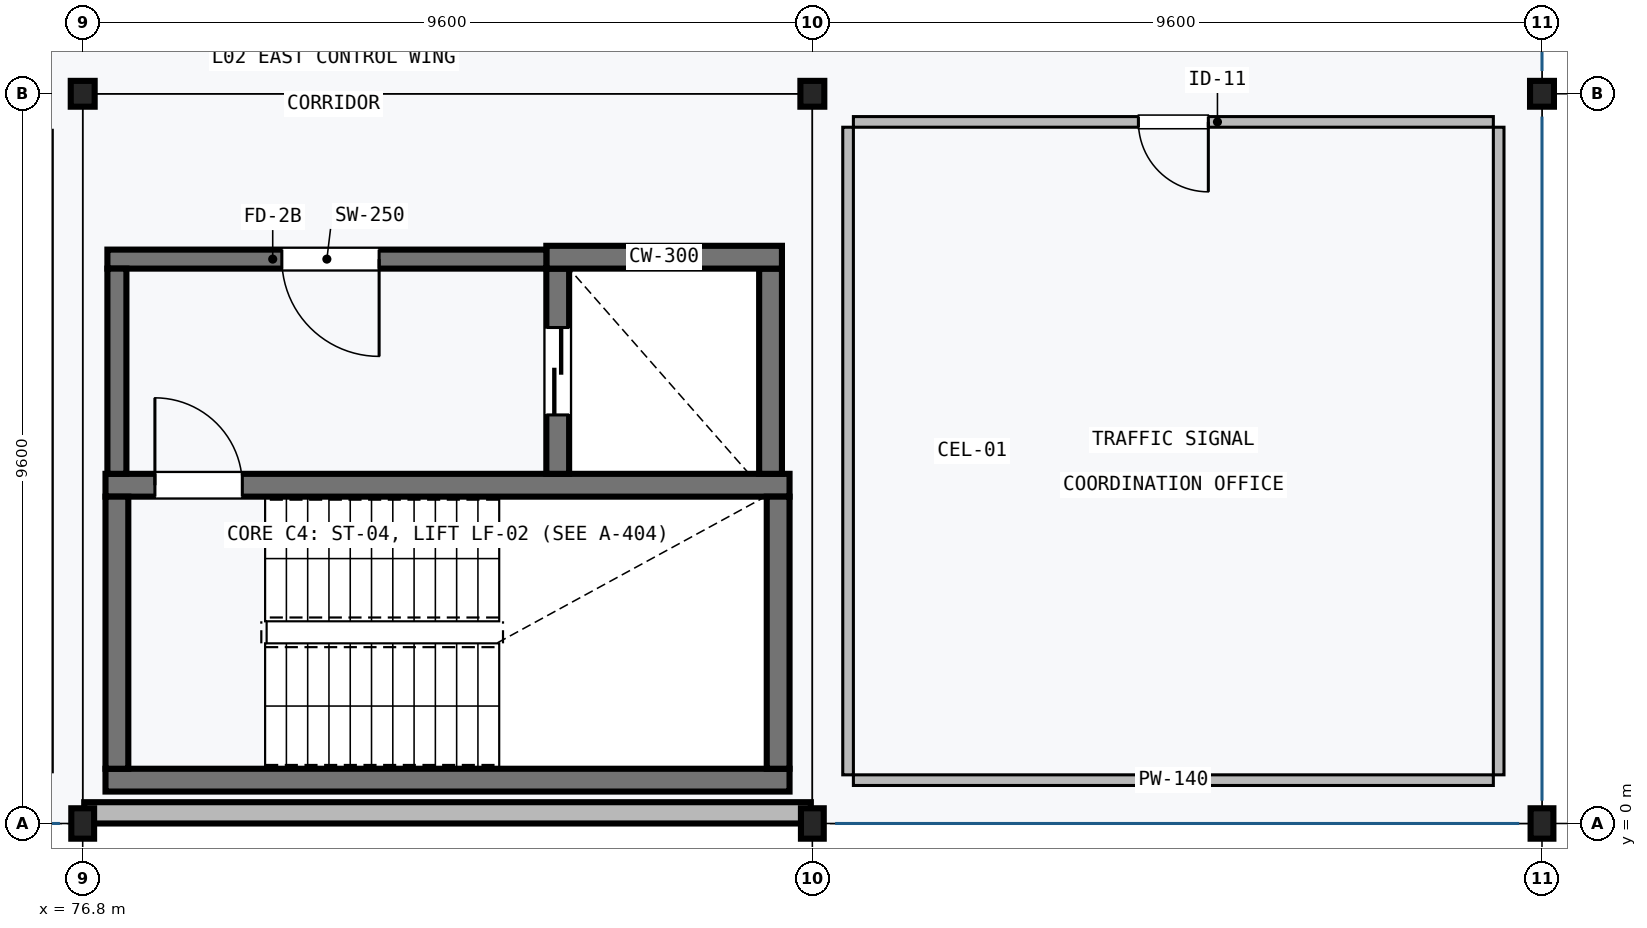
"""IFC4 building model, lengths in metres.
Left out: names, types, materials, properties, quantities, classifications, styles, units other than length and angle.
Written with IfcOpenShell. Run it as: python <this file> out.ifc"""

import sys

from ifc_helpers import new_model, si_unit, direction, frame, frame_2d, origin, origin_2d, place, context, subcontext, project, spatial, rectangle, i_section, extrude, element, fill, save


model = new_model("IFC4")
c1 = context("Model", 3, precision=1e-05, world=origin(), true_north=direction((0.0, 1.0)))
c2 = subcontext(c1, "Body", "Model", "MODEL_VIEW")
j1 = project(units=[si_unit("LENGTHUNIT", "METRE"), si_unit("PLANEANGLEUNIT", "RADIAN")], contexts=[c1])
p1 = place(None, origin())
s1 = spatial("IfcSite", under=j1, at=p1, CompositionType="ELEMENT")
p2 = place(p1, origin())
s2 = spatial("IfcBuilding", under=s1, at=p2, CompositionType="ELEMENT")
p3 = place(p2, frame((0.0, 0.0, 10.5)))
s3 = spatial("IfcBuildingStorey", under=s2, at=p3, CompositionType="ELEMENT", Elevation=10.5)
p4 = place(p3, frame((76.8, 0.0, 0.0), z_axis=(0.0, 0.0, 1.0), x_axis=(1.0, 0.0, 0.0)))
e1 = element("IfcColumn", 1, at=p4, inside=s3, PredefinedType="COLUMN", context=c2, shape_type="SweptSolid", body=[
    extrude(i_section(OverallWidth=0.3, OverallDepth=0.4, WebThickness=0.013, FlangeThickness=0.024, FilletRadius=0.027, at=origin_2d()), origin(), (0.0, 0.0, 1.0), 3.95),
])
p5 = place(p3, frame((76.8, 9.6, 0.0), z_axis=(0.0, 0.0, 1.0), x_axis=(1.0, 0.0, 0.0)))
e2 = element("IfcColumn", 2, at=p5, inside=s3, PredefinedType="COLUMN", context=c2, shape_type="SweptSolid", body=[
    extrude(i_section(OverallWidth=0.314, OverallDepth=0.34, WebThickness=0.019, FlangeThickness=0.031, FilletRadius=0.015, at=origin_2d()), origin(), (0.0, 0.0, 1.0), 3.95),
])
p6 = place(p3, frame((86.4, 0.0, 0.0), z_axis=(0.0, 0.0, 1.0), x_axis=(1.0, 0.0, 0.0)))
e3 = element("IfcColumn", 3, at=p6, inside=s3, PredefinedType="COLUMN", context=c2, shape_type="SweptSolid", body=[
    extrude(i_section(OverallWidth=0.3, OverallDepth=0.4, WebThickness=0.013, FlangeThickness=0.024, FilletRadius=0.027, at=origin_2d()), origin(), (0.0, 0.0, 1.0), 3.95),
])
p7 = place(p3, frame((86.4, 9.6, 0.0), z_axis=(0.0, 0.0, 1.0), x_axis=(1.0, 0.0, 0.0)))
e4 = element("IfcColumn", 4, at=p7, inside=s3, PredefinedType="COLUMN", context=c2, shape_type="SweptSolid", body=[
    extrude(i_section(OverallWidth=0.314, OverallDepth=0.34, WebThickness=0.019, FlangeThickness=0.031, FilletRadius=0.015, at=origin_2d()), origin(), (0.0, 0.0, 1.0), 3.95),
])
p8 = place(p3, frame((96.0, 0.0, 0.0), z_axis=(0.0, 0.0, 1.0), x_axis=(1.0, 0.0, 0.0)))
e5 = element("IfcColumn", 5, at=p8, inside=s3, PredefinedType="COLUMN", context=c2, shape_type="SweptSolid", body=[
    extrude(i_section(OverallWidth=0.3, OverallDepth=0.4, WebThickness=0.013, FlangeThickness=0.024, FilletRadius=0.027, at=origin_2d()), origin(), (0.0, 0.0, 1.0), 3.95),
])
p9 = place(p3, frame((96.0, 9.6, 0.0), z_axis=(0.0, 0.0, 1.0), x_axis=(1.0, 0.0, 0.0)))
e6 = element("IfcColumn", 6, at=p9, inside=s3, PredefinedType="COLUMN", context=c2, shape_type="SweptSolid", body=[
    extrude(i_section(OverallWidth=0.314, OverallDepth=0.34, WebThickness=0.019, FlangeThickness=0.031, FilletRadius=0.015, at=origin_2d()), origin(), (0.0, 0.0, 1.0), 3.95),
])
p10 = place(p3, frame((77.1, 0.57, 0.0), z_axis=(0.0, 0.0, 1.0), x_axis=(1.0, 0.0, 0.0)))
e7 = element("IfcWall", 7, at=p10, inside=s3, PredefinedType="SHEAR", context=c2, shape_type="SweptSolid", body=[
    extrude(rectangle(XDim=9.0, YDim=0.3, at=frame_2d((4.5, 0.0))), origin(), (0.0, 0.0, 1.0), 3.95),
])
p11 = place(p3, frame((86.1, 4.45, 0.0), z_axis=(0.0, 0.0, 1.0), x_axis=(-1.0, 0.0, 0.0)))
e8 = element("IfcWall", 8, at=p11, inside=s3, PredefinedType="SHEAR", context=c2, shape_type="SweptSolid", body=[
    extrude(rectangle(XDim=9.0, YDim=0.3, at=frame_2d((4.5, 0.0))), origin(), (0.0, 0.0, 1.0), 3.95),
])
p12 = place(p11, frame((7.2, 0.0, 0.0)))
e9 = element("IfcOpeningElement", 9, at=p12, cuts=e8, PredefinedType="OPENING", context=c2, shape_type="SweptSolid", body=[
    extrude(rectangle(XDim=1.15, YDim=2.15, at=frame_2d((0.575, 1.075))), frame((0.0, 0.16, 0.0), z_axis=(0.0, -1.0, 0.0), x_axis=(1.0, 0.0, 0.0)), (0.0, 0.0, 1.0), 0.32),
])
for number, where, z_axis, x_axis in (
    (10, (77.25, 0.72, 0.0), (0.0, 0.0, 1.0), (0.0, 1.0, 0.0)),
    (11, (85.95, 4.3, 0.0), (0.0, 0.0, 1.0), (0.0, -1.0, 0.0)),
):
    element("IfcWall", number, at=place(p3, frame(where, z_axis=z_axis, x_axis=x_axis)), inside=s3, PredefinedType="SHEAR", context=c2, shape_type="SweptSolid", body=[
        extrude(rectangle(XDim=3.58, YDim=0.3, at=frame_2d((1.79, 0.0))), origin(), (0.0, 0.0, 1.0), 3.95),
    ])
p13 = place(p3, frame((83.05, 7.3, 0.0), z_axis=(0.0, 0.0, 1.0), x_axis=(0.0, -1.0, 0.0)))
e12 = element("IfcWall", 12, at=p13, inside=s3, PredefinedType="SHEAR", context=c2, shape_type="SweptSolid", body=[
    extrude(rectangle(XDim=2.7, YDim=0.3, at=frame_2d((1.35, 0.0))), origin(), (0.0, 0.0, 1.0), 3.95),
])
p14 = place(p13, frame((0.775, 0.0, 0.0)))
e13 = element("IfcOpeningElement", 13, at=p14, cuts=e12, PredefinedType="OPENING", context=c2, shape_type="SweptSolid", body=[
    extrude(rectangle(XDim=1.15, YDim=2.1, at=frame_2d((0.575, 1.05))), frame((0.0, 0.16, 0.0), z_axis=(0.0, -1.0, 0.0), x_axis=(1.0, 0.0, 0.0)), (0.0, 0.0, 1.0), 0.32),
])
p15 = place(p3, frame((85.85, 4.6, 0.0), z_axis=(0.0, 0.0, 1.0), x_axis=(0.0, 1.0, 0.0)))
e14 = element("IfcWall", 14, at=p15, inside=s3, PredefinedType="SHEAR", context=c2, shape_type="SweptSolid", body=[
    extrude(rectangle(XDim=2.7, YDim=0.3, at=frame_2d((1.35, 0.0))), origin(), (0.0, 0.0, 1.0), 3.95),
])
p16 = place(p3, frame((82.9, 7.45, 0.0), z_axis=(0.0, 0.0, 1.0), x_axis=(1.0, 0.0, 0.0)))
e15 = element("IfcWall", 15, at=p16, inside=s3, PredefinedType="SHEAR", context=c2, shape_type="SweptSolid", body=[
    extrude(rectangle(XDim=3.1, YDim=0.3, at=frame_2d((1.55, 0.0))), origin(), (0.0, 0.0, 1.0), 3.95),
])
p17 = place(p3, frame((82.9, 7.425, 0.0), z_axis=(0.0, 0.0, 1.0), x_axis=(-1.0, 0.0, 0.0)))
e16 = element("IfcWall", 16, at=p17, inside=s3, PredefinedType="SHEAR", context=c2, shape_type="SweptSolid", body=[
    extrude(rectangle(XDim=5.775, YDim=0.25, at=frame_2d((2.887, 0.0))), origin(), (0.0, 0.0, 1.0), 3.95),
])
p18 = place(p17, frame((2.2, 0.0, 0.0)))
e17 = element("IfcOpeningElement", 17, at=p18, cuts=e16, PredefinedType="OPENING", context=c2, shape_type="SweptSolid", body=[
    extrude(rectangle(XDim=1.28, YDim=2.2, at=frame_2d((0.64, 1.1))), frame((0.0, 0.135, 0.0), z_axis=(0.0, -1.0, 0.0), x_axis=(1.0, 0.0, 0.0)), (0.0, 0.0, 1.0), 0.27),
])
p19 = place(p3, frame((77.25, 4.6, 0.0), z_axis=(0.0, 0.0, 1.0), x_axis=(0.0, 1.0, 0.0)))
e18 = element("IfcWall", 18, at=p19, inside=s3, PredefinedType="SHEAR", context=c2, shape_type="SweptSolid", body=[
    extrude(rectangle(XDim=2.7, YDim=0.25, at=frame_2d((1.35, 0.0))), origin(), (0.0, 0.0, 1.0), 3.95),
])
p20 = place(p3, frame((86.38, 0.14, 0.0), z_axis=(0.0, 0.0, 1.0), x_axis=(-1.0, 0.0, 0.0)))
e19 = element("IfcWall", 19, at=p20, inside=s3, PredefinedType="SOLIDWALL", context=c2, shape_type="SweptSolid", body=[
    extrude(rectangle(XDim=9.56, YDim=0.28, at=frame_2d((4.78, 0.0))), origin(), (0.0, 0.0, 1.0), 3.66),
])
p21 = place(p3, frame((76.31, 9.12, 0.0), z_axis=(0.0, 0.0, 1.0), x_axis=(0.0, -1.0, 0.0)))
e20 = element("IfcWall", 20, at=p21, inside=s3, PredefinedType="PARTITIONING", context=c2, shape_type="SweptSolid", body=[
    extrude(rectangle(XDim=8.44, YDim=0.18, at=frame_2d((4.22, 0.0))), origin(), (0.0, 0.0, 1.0), 3.59),
])
p22 = place(p3, frame((95.36, 0.57, 0.0), z_axis=(0.0, 0.0, 1.0), x_axis=(-1.0, 0.0, 0.0)))
e21 = element("IfcWall", 21, at=p22, inside=s3, PredefinedType="PARTITIONING", context=c2, shape_type="SweptSolid", body=[
    extrude(rectangle(XDim=8.42, YDim=0.14, at=frame_2d((4.21, 0.0))), origin(), (0.0, 0.0, 1.0), 3.59),
])
p23 = place(p3, frame((86.94, 9.23, 0.0), z_axis=(0.0, 0.0, 1.0), x_axis=(1.0, 0.0, 0.0)))
e22 = element("IfcWall", 22, at=p23, inside=s3, PredefinedType="PARTITIONING", context=c2, shape_type="SweptSolid", body=[
    extrude(rectangle(XDim=8.42, YDim=0.14, at=frame_2d((4.21, 0.0))), origin(), (0.0, 0.0, 1.0), 3.59),
])
p24 = place(p23, frame((3.75, 0.0, 0.0)))
e23 = element("IfcOpeningElement", 23, at=p24, cuts=e22, PredefinedType="OPENING", context=c2, shape_type="SweptSolid", body=[
    extrude(rectangle(XDim=0.92, YDim=2.15, at=frame_2d((0.46, 1.075))), frame((0.0, 0.08, 0.0), z_axis=(0.0, -1.0, 0.0), x_axis=(1.0, 0.0, 0.0)), (0.0, 0.0, 1.0), 0.16),
])
for number, where, z_axis, x_axis in (
    (24, (86.87, 0.64, 0.0), (0.0, 0.0, 1.0), (0.0, 1.0, 0.0)),
    (25, (95.43, 9.16, 0.0), (0.0, 0.0, 1.0), (0.0, -1.0, 0.0)),
):
    element("IfcWall", number, at=place(p3, frame(where, z_axis=z_axis, x_axis=x_axis)), inside=s3, PredefinedType="PARTITIONING", context=c2, shape_type="SweptSolid", body=[
        extrude(rectangle(XDim=8.52, YDim=0.14, at=frame_2d((4.26, 0.0))), origin(), (0.0, 0.0, 1.0), 3.59),
    ])
p25 = place(p12, frame((1.15, 0.0, 0.0), z_axis=(0.0, 0.0, 1.0), x_axis=(-1.0, 0.0, 0.0)))
e26 = element("IfcDoor", 26, at=p25, inside=s3, OperationType="SINGLE_SWING_RIGHT", PredefinedType="DOOR", context=c2, shape_type="SweptSolid", body=[
    extrude(rectangle(XDim=1.15, YDim=2.15, at=frame_2d((0.575, 1.075))), frame((0.0, 0.025, 0.0), z_axis=(0.0, -1.0, 0.0), x_axis=(1.0, 0.0, 0.0)), (0.0, 0.0, 1.0), 0.05),
])
fill(e9, e26)
p26 = place(p14, frame((1.15, 0.0, 0.0), z_axis=(0.0, 0.0, 1.0), x_axis=(-1.0, 0.0, 0.0)))
e27 = element("IfcDoor", 27, at=p26, inside=s3, OperationType="DOUBLE_DOOR_SLIDING", PredefinedType="DOOR", context=c2, shape_type="SweptSolid", body=[
    extrude(rectangle(XDim=1.15, YDim=2.1, at=frame_2d((0.575, 1.05))), frame((0.0, 0.025, 0.0), z_axis=(0.0, -1.0, 0.0), x_axis=(1.0, 0.0, 0.0)), (0.0, 0.0, 1.0), 0.05),
])
fill(e13, e27)
p27 = place(p18, origin())
e28 = element("IfcDoor", 28, at=p27, inside=s3, OperationType="SINGLE_SWING_LEFT", PredefinedType="DOOR", context=c2, shape_type="SweptSolid", body=[
    extrude(rectangle(XDim=1.28, YDim=2.2, at=frame_2d((0.64, 1.1))), frame((0.0, 0.025, 0.0), z_axis=(0.0, -1.0, 0.0), x_axis=(1.0, 0.0, 0.0)), (0.0, 0.0, 1.0), 0.05),
])
fill(e17, e28)
p28 = place(p24, frame((0.92, 0.0, 0.0), z_axis=(0.0, 0.0, 1.0), x_axis=(-1.0, 0.0, 0.0)))
e29 = element("IfcDoor", 29, at=p28, inside=s3, OperationType="SINGLE_SWING_RIGHT", PredefinedType="DOOR", context=c2, shape_type="SweptSolid", body=[
    extrude(rectangle(XDim=0.92, YDim=2.15, at=frame_2d((0.46, 1.075))), frame((0.0, 0.025, 0.0), z_axis=(0.0, -1.0, 0.0), x_axis=(1.0, 0.0, 0.0)), (0.0, 0.0, 1.0), 0.05),
])
fill(e23, e29)
save(model, sys.argv[1])
